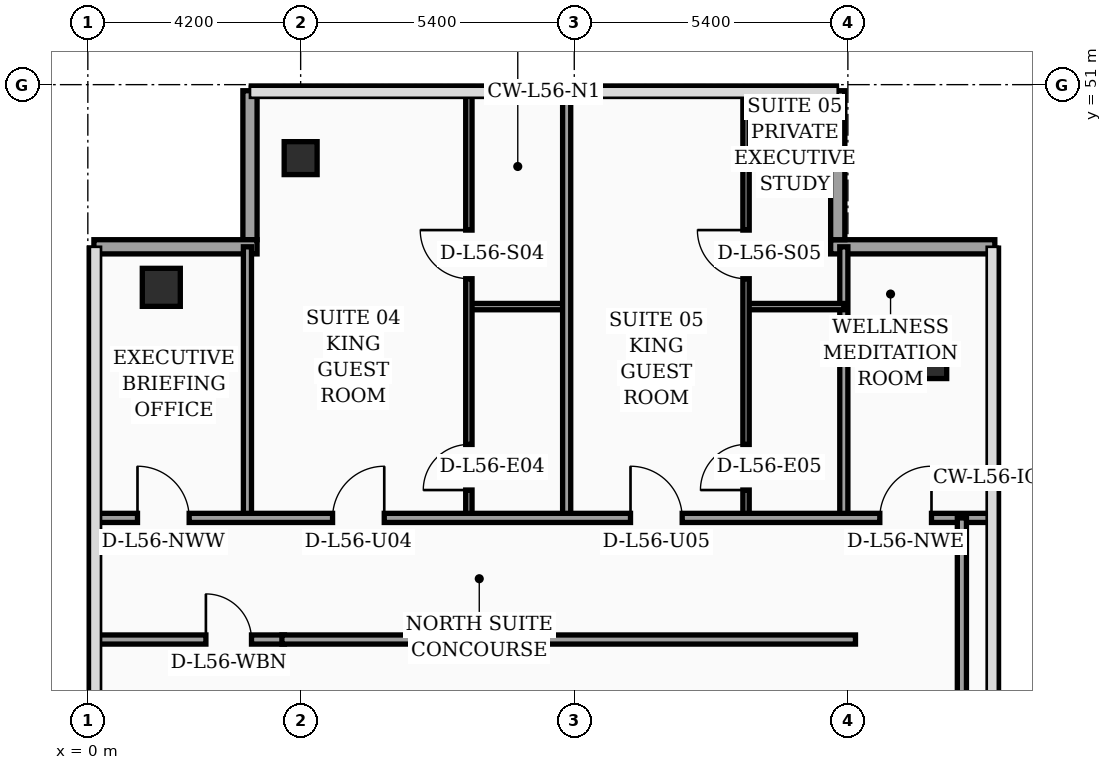
"""IFC4 building model, lengths in metres.
Left out: names, types, materials, properties, quantities, classifications, styles, units other than length and angle.
Written with IfcOpenShell. Run it as: python <this file> out.ifc"""

import sys

from ifc_helpers import new_model, si_unit, direction, frame, frame_2d, origin, origin_2d, place, context, subcontext, project, spatial, rectangle, hollow_rectangle, extrude, element, fill, save


model = new_model("IFC4")
c1 = context("Model", 3, precision=1e-05, world=origin(), true_north=direction((0.0, 1.0)))
c2 = subcontext(c1, "Body", "Model", "MODEL_VIEW")
j1 = project(units=[si_unit("LENGTHUNIT", "METRE"), si_unit("PLANEANGLEUNIT", "RADIAN")], contexts=[c1])
p1 = place(None, origin())
s1 = spatial("IfcSite", under=j1, at=p1, CompositionType="ELEMENT")
p2 = place(p1, origin())
s2 = spatial("IfcBuilding", under=s1, at=p2, CompositionType="ELEMENT")
p3 = place(p2, frame((0.0, 0.0, 226.9)))
s3 = spatial("IfcBuildingStorey", under=s2, at=p3, CompositionType="ELEMENT", Elevation=226.9)
p4 = place(p3, frame((1.45, 47.0, 0.0), z_axis=(0.0, 0.0, 1.0), x_axis=(1.0, 0.0, 0.0)))
e1 = element("IfcColumn", 1, at=p4, inside=s3, PredefinedType="COLUMN", context=c2, shape_type="SweptSolid", body=[
    extrude(hollow_rectangle(XDim=0.75, YDim=0.75, WallThickness=0.032, at=origin_2d()), origin(), (0.0, 0.0, 1.0), 3.56),
])
p5 = place(p3, frame((4.2, 49.55, 0.0), z_axis=(0.0, 0.0, 1.0), x_axis=(1.0, 0.0, 0.0)))
e2 = element("IfcColumn", 2, at=p5, inside=s3, PredefinedType="COLUMN", context=c2, shape_type="SweptSolid", body=[
    extrude(hollow_rectangle(XDim=0.65, YDim=0.65, WallThickness=0.028, at=origin_2d()), origin(), (0.0, 0.0, 1.0), 3.56),
])
p6 = place(p3, frame((16.55, 45.6, 0.0), z_axis=(0.0, 0.0, 1.0), x_axis=(1.0, 0.0, 0.0)))
e3 = element("IfcColumn", 3, at=p6, inside=s3, PredefinedType="COLUMN", context=c2, shape_type="SweptSolid", body=[
    extrude(rectangle(XDim=0.8, YDim=0.8, at=origin_2d()), origin(), (0.0, 0.0, 1.0), 3.56),
])
p7 = place(p3, frame((17.9, 47.8, 0.0), z_axis=(0.0, 0.0, 1.0), x_axis=(-1.0, 0.0, 0.0)))
e4 = element("IfcWall", 4, at=p7, inside=s3, PredefinedType="SOLIDWALL", context=c2, shape_type="SweptSolid", body=[
    extrude(rectangle(XDim=3.24, YDim=0.28, at=frame_2d((1.62, 0.0))), origin(), (0.0, 0.0, 1.0), 3.56),
])
p8 = place(p3, frame((14.8, 47.94, 0.0), z_axis=(0.0, 0.0, 1.0), x_axis=(0.0, 1.0, 0.0)))
e5 = element("IfcWall", 5, at=p8, inside=s3, PredefinedType="SOLIDWALL", context=c2, shape_type="SweptSolid", body=[
    extrude(rectangle(XDim=2.94, YDim=0.28, at=frame_2d((1.47, 0.0))), origin(), (0.0, 0.0, 1.0), 3.56),
])
p9 = place(p3, frame((3.2, 50.88, 0.0), z_axis=(0.0, 0.0, 1.0), x_axis=(0.0, -1.0, 0.0)))
e6 = element("IfcWall", 6, at=p9, inside=s3, PredefinedType="SOLIDWALL", context=c2, shape_type="SweptSolid", body=[
    extrude(rectangle(XDim=2.94, YDim=0.28, at=frame_2d((1.47, 0.0))), origin(), (0.0, 0.0, 1.0), 3.09),
])
p10 = place(p3, frame((3.34, 47.8, 0.0), z_axis=(0.0, 0.0, 1.0), x_axis=(-1.0, 0.0, 0.0)))
e7 = element("IfcWall", 7, at=p10, inside=s3, PredefinedType="SOLIDWALL", context=c2, shape_type="SweptSolid", body=[
    extrude(rectangle(XDim=3.22, YDim=0.28, at=frame_2d((1.61, 0.0))), origin(), (0.0, 0.0, 1.0), 3.09),
])
p11 = place(p3, frame((0.08, 40.05, 0.0), z_axis=(0.0, 0.0, 1.0), x_axis=(1.0, 0.0, 0.0)))
e8 = element("IfcWall", 8, at=p11, inside=s3, PredefinedType="PARTITIONING", context=c2, shape_type="SweptSolid", body=[
    extrude(rectangle(XDim=3.8, YDim=0.18, at=frame_2d((1.9, 0.0))), origin(), (0.0, 0.0, 1.0), 2.94),
])
p12 = place(p11, frame((2.25, 0.0, 0.0)))
e9 = element("IfcOpeningElement", 9, at=p12, cuts=e8, PredefinedType="OPENING", context=c2, shape_type="SweptSolid", body=[
    extrude(rectangle(XDim=0.9, YDim=2.15, at=frame_2d((0.45, 1.075))), frame((0.0, 0.1, 0.0), z_axis=(0.0, -1.0, 0.0), x_axis=(1.0, 0.0, 0.0)), (0.0, 0.0, 1.0), 0.2),
])
p13 = place(p3, frame((3.15, 42.45, 0.0), z_axis=(0.0, 0.0, 1.0), x_axis=(0.0, 1.0, 0.0)))
e10 = element("IfcWall", 10, at=p13, inside=s3, PredefinedType="PARTITIONING", context=c2, shape_type="SweptSolid", body=[
    extrude(rectangle(XDim=5.35, YDim=0.16, at=frame_2d((2.675, 0.0))), origin(), (0.0, 0.0, 1.0), 3.14),
])
p14 = place(p3, frame((14.92, 42.45, 0.0), z_axis=(0.0, 0.0, 1.0), x_axis=(0.0, 1.0, 0.0)))
e11 = element("IfcWall", 11, at=p14, inside=s3, PredefinedType="PARTITIONING", context=c2, shape_type="SweptSolid", body=[
    extrude(rectangle(XDim=5.35, YDim=0.16, at=frame_2d((2.675, 0.0))), origin(), (0.0, 0.0, 1.0), 3.09),
])
p15 = place(p3, frame((7.52, 46.62, 0.0), z_axis=(0.0, 0.0, 1.0), x_axis=(1.0, 0.0, 0.0)))
e12 = element("IfcWall", 12, at=p15, inside=s3, PredefinedType="PARTITIONING", context=c2, shape_type="SweptSolid", body=[
    extrude(rectangle(XDim=1.93, YDim=0.125, at=frame_2d((0.965, 0.0))), origin(), (0.0, 0.0, 1.0), 3.56),
])
p16 = place(p3, frame((7.52, 42.45, 0.0), z_axis=(0.0, 0.0, 1.0), x_axis=(0.0, 1.0, 0.0)))
e13 = element("IfcWall", 13, at=p16, inside=s3, PredefinedType="PARTITIONING", context=c2, shape_type="SweptSolid", body=[
    extrude(rectangle(XDim=8.49, YDim=0.125, at=frame_2d((4.245, 0.0))), origin(), (0.0, 0.0, 1.0), 3.09),
])
p17 = place(p16, frame((0.55, 0.0, 0.0)))
e14 = element("IfcOpeningElement", 14, at=p17, cuts=e13, PredefinedType="OPENING", context=c2, shape_type="SweptSolid", body=[
    extrude(rectangle(XDim=0.9, YDim=2.15, at=frame_2d((0.45, 1.075))), frame((0.0, 0.073, 0.0), z_axis=(0.0, -1.0, 0.0), x_axis=(1.0, 0.0, 0.0)), (0.0, 0.0, 1.0), 0.145),
])
p18 = place(p16, frame((4.72, 0.0, 0.0)))
e15 = element("IfcOpeningElement", 15, at=p18, cuts=e13, PredefinedType="OPENING", context=c2, shape_type="SweptSolid", body=[
    extrude(rectangle(XDim=0.96, YDim=2.2, at=frame_2d((0.48, 1.1))), frame((0.0, 0.073, 0.0), z_axis=(0.0, -1.0, 0.0), x_axis=(1.0, 0.0, 0.0)), (0.0, 0.0, 1.0), 0.145),
])
p19 = place(p3, frame((12.99, 46.62, 0.0), z_axis=(0.0, 0.0, 1.0), x_axis=(1.0, 0.0, 0.0)))
e16 = element("IfcWall", 16, at=p19, inside=s3, PredefinedType="PARTITIONING", context=c2, shape_type="SweptSolid", body=[
    extrude(rectangle(XDim=1.93, YDim=0.125, at=frame_2d((0.965, 0.0))), origin(), (0.0, 0.0, 1.0), 3.09),
])
p20 = place(p3, frame((12.99, 42.45, 0.0), z_axis=(0.0, 0.0, 1.0), x_axis=(0.0, 1.0, 0.0)))
e17 = element("IfcWall", 17, at=p20, inside=s3, PredefinedType="PARTITIONING", context=c2, shape_type="SweptSolid", body=[
    extrude(rectangle(XDim=8.49, YDim=0.125, at=frame_2d((4.245, 0.0))), origin(), (0.0, 0.0, 1.0), 3.09),
])
p21 = place(p20, frame((0.55, 0.0, 0.0)))
e18 = element("IfcOpeningElement", 18, at=p21, cuts=e17, PredefinedType="OPENING", context=c2, shape_type="SweptSolid", body=[
    extrude(rectangle(XDim=0.9, YDim=2.15, at=frame_2d((0.45, 1.075))), frame((0.0, 0.073, 0.0), z_axis=(0.0, -1.0, 0.0), x_axis=(1.0, 0.0, 0.0)), (0.0, 0.0, 1.0), 0.145),
])
p22 = place(p20, frame((4.72, 0.0, 0.0)))
e19 = element("IfcOpeningElement", 19, at=p22, cuts=e17, PredefinedType="OPENING", context=c2, shape_type="SweptSolid", body=[
    extrude(rectangle(XDim=0.96, YDim=2.2, at=frame_2d((0.48, 1.1))), frame((0.0, 0.073, 0.0), z_axis=(0.0, -1.0, 0.0), x_axis=(1.0, 0.0, 0.0)), (0.0, 0.0, 1.0), 0.145),
])
p23 = place(p3, frame((9.45, 42.45, 0.0), z_axis=(0.0, 0.0, 1.0), x_axis=(0.0, 1.0, 0.0)))
e20 = element("IfcWall", 20, at=p23, inside=s3, PredefinedType="PARTITIONING", context=c2, shape_type="SweptSolid", body=[
    extrude(rectangle(XDim=8.49, YDim=0.16, at=frame_2d((4.245, 0.0))), origin(), (0.0, 0.0, 1.0), 3.09),
])
p24 = place(p3, frame((0.08, 42.45, 0.0), z_axis=(0.0, 0.0, 1.0), x_axis=(1.0, 0.0, 0.0)))
e21 = element("IfcWall", 21, at=p24, inside=s3, PredefinedType="PARTITIONING", context=c2, shape_type="SweptSolid", body=[
    extrude(rectangle(XDim=17.77, YDim=0.18, at=frame_2d((8.885, 0.0))), origin(), (0.0, 0.0, 1.0), 2.94),
])
p25 = place(p24, frame((0.9, 0.0, 0.0)))
e22 = element("IfcOpeningElement", 22, at=p25, cuts=e21, PredefinedType="OPENING", context=c2, shape_type="SweptSolid", body=[
    extrude(rectangle(XDim=1.02, YDim=2.2, at=frame_2d((0.51, 1.1))), frame((0.0, 0.1, 0.0), z_axis=(0.0, -1.0, 0.0), x_axis=(1.0, 0.0, 0.0)), (0.0, 0.0, 1.0), 0.2),
])
p26 = place(p24, frame((4.75, 0.0, 0.0)))
e23 = element("IfcOpeningElement", 23, at=p26, cuts=e21, PredefinedType="OPENING", context=c2, shape_type="SweptSolid", body=[
    extrude(rectangle(XDim=1.02, YDim=2.2, at=frame_2d((0.51, 1.1))), frame((0.0, 0.1, 0.0), z_axis=(0.0, -1.0, 0.0), x_axis=(1.0, 0.0, 0.0)), (0.0, 0.0, 1.0), 0.2),
])
p27 = place(p24, frame((10.63, 0.0, 0.0)))
e24 = element("IfcOpeningElement", 24, at=p27, cuts=e21, PredefinedType="OPENING", context=c2, shape_type="SweptSolid", body=[
    extrude(rectangle(XDim=1.02, YDim=2.2, at=frame_2d((0.51, 1.1))), frame((0.0, 0.1, 0.0), z_axis=(0.0, -1.0, 0.0), x_axis=(1.0, 0.0, 0.0)), (0.0, 0.0, 1.0), 0.2),
])
p28 = place(p24, frame((15.55, 0.0, 0.0)))
e25 = element("IfcOpeningElement", 25, at=p28, cuts=e21, PredefinedType="OPENING", context=c2, shape_type="SweptSolid", body=[
    extrude(rectangle(XDim=1.02, YDim=2.2, at=frame_2d((0.51, 1.1))), frame((0.0, 0.1, 0.0), z_axis=(0.0, -1.0, 0.0), x_axis=(1.0, 0.0, 0.0)), (0.0, 0.0, 1.0), 0.2),
])
p29 = place(p3, frame((17.25, 24.3, 0.0), z_axis=(0.0, 0.0, 1.0), x_axis=(0.0, 1.0, 0.0)))
e26 = element("IfcWall", 26, at=p29, inside=s3, PredefinedType="PARTITIONING", context=c2, shape_type="SweptSolid", body=[
    extrude(rectangle(XDim=18.15, YDim=0.18, at=frame_2d((9.075, 0.0))), origin(), (0.0, 0.0, 1.0), 2.94),
])
p30 = place(p29, frame((3.2, 0.0, 0.0)))
e27 = element("IfcOpeningElement", 27, at=p30, cuts=e26, PredefinedType="OPENING", context=c2, shape_type="SweptSolid", body=[
    extrude(rectangle(XDim=1.02, YDim=2.2, at=frame_2d((0.51, 1.1))), frame((0.0, 0.1, 0.0), z_axis=(0.0, -1.0, 0.0), x_axis=(1.0, 0.0, 0.0)), (0.0, 0.0, 1.0), 0.2),
])
p31 = place(p3, frame((3.83, 40.05, 0.0), z_axis=(0.0, 0.0, 1.0), x_axis=(1.0, 0.0, 0.0)))
e28 = element("IfcWall", 28, at=p31, inside=s3, PredefinedType="PARTITIONING", context=c2, shape_type="SweptSolid", body=[
    extrude(rectangle(XDim=11.32, YDim=0.18, at=frame_2d((5.66, 0.0))), origin(), (0.0, 0.0, 1.0), 2.94),
])
p32 = place(p12, origin())
e29 = element("IfcDoor", 29, at=p32, inside=s3, OperationType="SINGLE_SWING_LEFT", PredefinedType="DOOR", context=c2, shape_type="SweptSolid", body=[
    extrude(rectangle(XDim=0.9, YDim=2.15, at=frame_2d((0.45, 1.075))), frame((0.0, 0.025, 0.0), z_axis=(0.0, -1.0, 0.0), x_axis=(1.0, 0.0, 0.0)), (0.0, 0.0, 1.0), 0.05),
])
fill(e9, e29)
p33 = place(p17, origin())
e30 = element("IfcDoor", 30, at=p33, inside=s3, OperationType="SINGLE_SWING_LEFT", PredefinedType="DOOR", context=c2, shape_type="SweptSolid", body=[
    extrude(rectangle(XDim=0.9, YDim=2.15, at=frame_2d((0.45, 1.075))), frame((0.0, 0.025, 0.0), z_axis=(0.0, -1.0, 0.0), x_axis=(1.0, 0.0, 0.0)), (0.0, 0.0, 1.0), 0.05),
])
fill(e14, e30)
p34 = place(p18, origin())
e31 = element("IfcDoor", 31, at=p34, inside=s3, OperationType="SINGLE_SWING_RIGHT", PredefinedType="DOOR", context=c2, shape_type="SweptSolid", body=[
    extrude(rectangle(XDim=0.96, YDim=2.2, at=frame_2d((0.48, 1.1))), frame((0.0, 0.025, 0.0), z_axis=(0.0, -1.0, 0.0), x_axis=(1.0, 0.0, 0.0)), (0.0, 0.0, 1.0), 0.05),
])
fill(e15, e31)
p35 = place(p21, origin())
e32 = element("IfcDoor", 32, at=p35, inside=s3, OperationType="SINGLE_SWING_LEFT", PredefinedType="DOOR", context=c2, shape_type="SweptSolid", body=[
    extrude(rectangle(XDim=0.9, YDim=2.15, at=frame_2d((0.45, 1.075))), frame((0.0, 0.025, 0.0), z_axis=(0.0, -1.0, 0.0), x_axis=(1.0, 0.0, 0.0)), (0.0, 0.0, 1.0), 0.05),
])
fill(e18, e32)
p36 = place(p22, origin())
e33 = element("IfcDoor", 33, at=p36, inside=s3, OperationType="SINGLE_SWING_RIGHT", PredefinedType="DOOR", context=c2, shape_type="SweptSolid", body=[
    extrude(rectangle(XDim=0.96, YDim=2.2, at=frame_2d((0.48, 1.1))), frame((0.0, 0.025, 0.0), z_axis=(0.0, -1.0, 0.0), x_axis=(1.0, 0.0, 0.0)), (0.0, 0.0, 1.0), 0.05),
])
fill(e19, e33)
p37 = place(p25, origin())
e34 = element("IfcDoor", 34, at=p37, inside=s3, OperationType="SINGLE_SWING_LEFT", PredefinedType="DOOR", context=c2, shape_type="SweptSolid", body=[
    extrude(rectangle(XDim=1.02, YDim=2.2, at=frame_2d((0.51, 1.1))), frame((0.0, 0.025, 0.0), z_axis=(0.0, -1.0, 0.0), x_axis=(1.0, 0.0, 0.0)), (0.0, 0.0, 1.0), 0.05),
])
fill(e22, e34)
p38 = place(p26, origin())
e35 = element("IfcDoor", 35, at=p38, inside=s3, OperationType="SINGLE_SWING_RIGHT", PredefinedType="DOOR", context=c2, shape_type="SweptSolid", body=[
    extrude(rectangle(XDim=1.02, YDim=2.2, at=frame_2d((0.51, 1.1))), frame((0.0, 0.025, 0.0), z_axis=(0.0, -1.0, 0.0), x_axis=(1.0, 0.0, 0.0)), (0.0, 0.0, 1.0), 0.05),
])
fill(e23, e35)
p39 = place(p27, origin())
e36 = element("IfcDoor", 36, at=p39, inside=s3, OperationType="SINGLE_SWING_LEFT", PredefinedType="DOOR", context=c2, shape_type="SweptSolid", body=[
    extrude(rectangle(XDim=1.02, YDim=2.2, at=frame_2d((0.51, 1.1))), frame((0.0, 0.025, 0.0), z_axis=(0.0, -1.0, 0.0), x_axis=(1.0, 0.0, 0.0)), (0.0, 0.0, 1.0), 0.05),
])
fill(e24, e36)
p40 = place(p28, origin())
e37 = element("IfcDoor", 37, at=p40, inside=s3, OperationType="SINGLE_SWING_RIGHT", PredefinedType="DOOR", context=c2, shape_type="SweptSolid", body=[
    extrude(rectangle(XDim=1.02, YDim=2.2, at=frame_2d((0.51, 1.1))), frame((0.0, 0.025, 0.0), z_axis=(0.0, -1.0, 0.0), x_axis=(1.0, 0.0, 0.0)), (0.0, 0.0, 1.0), 0.05),
])
fill(e25, e37)
save(model, sys.argv[1])
